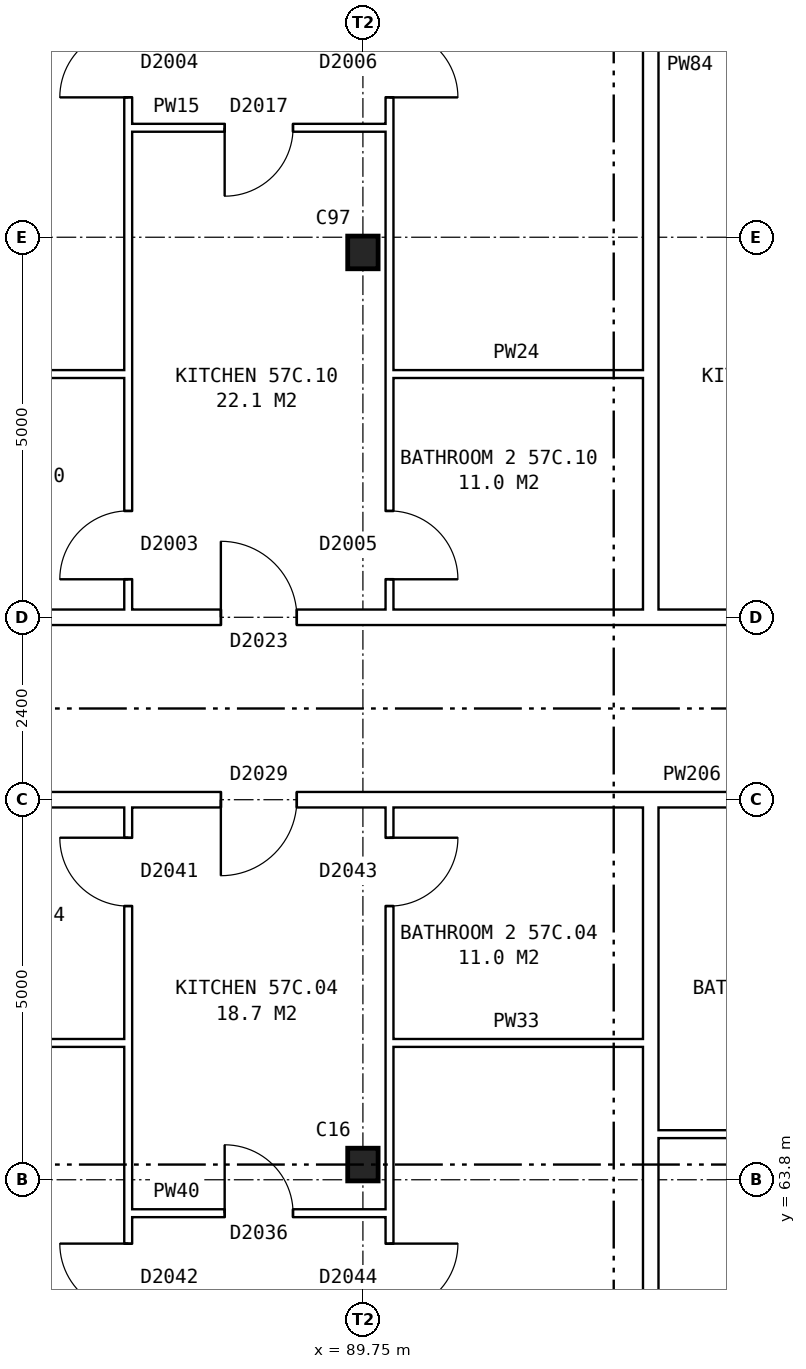
"""IFC4 building model, lengths in metres.
Left out: names, types, materials, properties, quantities, classifications, styles, units other than length and angle.
Written with IfcOpenShell. Run it as: python <this file> out.ifc"""

import sys

from ifc_helpers import new_model, si_unit, direction, frame, frame_2d, origin, origin_2d, place, context, subcontext, project, spatial, rectangle, i_section, extrude, element, fill, save


model = new_model("IFC4")
c1 = context("Model", 3, precision=1e-05, world=origin(), true_north=direction((0.0, 1.0)))
c2 = subcontext(c1, "Body", "Model", "MODEL_VIEW")
j1 = project(units=[si_unit("LENGTHUNIT", "METRE"), si_unit("PLANEANGLEUNIT", "RADIAN")], contexts=[c1])
p1 = place(None, origin())
s1 = spatial("IfcSite", under=j1, at=p1, CompositionType="ELEMENT")
p2 = place(p1, origin())
s2 = spatial("IfcBuilding", under=s1, at=p2, CompositionType="ELEMENT")
p3 = place(p2, frame((0.0, 0.0, 202.8)))
s3 = spatial("IfcBuildingStorey", under=s2, at=p3, CompositionType="ELEMENT", Elevation=202.8)
for number, where, z_axis, x_axis in (
    (1, (89.75, 64.0, 0.0), (0.0, 0.0, 1.0), (1.0, 0.0, 0.0)),
    (2, (89.75, 76.0, 0.0), (0.0, 0.0, 1.0), (1.0, 0.0, 0.0)),
):
    element("IfcColumn", number, at=place(p3, frame(where, z_axis=z_axis, x_axis=x_axis)), inside=s3, PredefinedType="COLUMN", context=c2, shape_type="SweptSolid", body=[
        extrude(i_section(OverallWidth=0.4, OverallDepth=0.43, WebThickness=0.04, FlangeThickness=0.04, at=origin_2d()), origin(), (0.0, 0.0, 1.0), 2.85),
    ])
p4 = place(p3, frame((86.662, 63.36, 0.0), z_axis=(0.0, 0.0, 1.0), x_axis=(1.0, 0.0, 0.0)))
e3 = element("IfcWall", 3, at=p4, inside=s3, PredefinedType="PARTITIONING", context=c2, shape_type="SweptSolid", body=[
    extrude(rectangle(XDim=3.438, YDim=0.1, at=frame_2d((1.719, 0.0))), origin(), (0.0, 0.0, 1.0), 2.85),
])
p5 = place(p4, frame((1.269, 0.0, 0.0)))
e4 = element("IfcOpeningElement", 4, at=p5, cuts=e3, PredefinedType="OPENING", context=c2, shape_type="SweptSolid", body=[
    extrude(rectangle(XDim=0.9, YDim=2.1, at=frame_2d((0.45, 1.05))), frame((0.0, 0.06, 0.0), z_axis=(0.0, -1.0, 0.0), x_axis=(1.0, 0.0, 0.0)), (0.0, 0.0, 1.0), 0.12),
])
p6 = place(p3, frame((93.637, 64.4, 0.0), z_axis=(0.0, 0.0, 1.0), x_axis=(1.0, 0.0, 0.0)))
e5 = element("IfcWall", 5, at=p6, inside=s3, PredefinedType="PARTITIONING", context=c2, shape_type="SweptSolid", body=[
    extrude(rectangle(XDim=3.338, YDim=0.1, at=frame_2d((1.669, 0.0))), origin(), (0.0, 0.0, 1.0), 2.85),
])
p7 = place(p3, frame((83.325, 65.6, 0.0), z_axis=(0.0, 0.0, 1.0), x_axis=(1.0, 0.0, 0.0)))
e6 = element("IfcWall", 6, at=p7, inside=s3, PredefinedType="PARTITIONING", context=c2, shape_type="SweptSolid", body=[
    extrude(rectangle(XDim=3.337, YDim=0.1, at=frame_2d((1.668, 0.0))), origin(), (0.0, 0.0, 1.0), 2.85),
])
p8 = place(p3, frame((90.1, 65.6, 0.0), z_axis=(0.0, 0.0, 1.0), x_axis=(1.0, 0.0, 0.0)))
e7 = element("IfcWall", 7, at=p8, inside=s3, PredefinedType="PARTITIONING", context=c2, shape_type="SweptSolid", body=[
    extrude(rectangle(XDim=3.337, YDim=0.1, at=frame_2d((1.668, 0.0))), origin(), (0.0, 0.0, 1.0), 2.85),
])
p9 = place(p3, frame((75.64, 68.8, 0.0), z_axis=(0.0, 0.0, 1.0), x_axis=(1.0, 0.0, 0.0)))
e8 = element("IfcWall", 8, at=p9, inside=s3, PredefinedType="PARTITIONING", context=c2, shape_type="SweptSolid", body=[
    extrude(rectangle(XDim=55.72, YDim=0.2, at=frame_2d((27.86, 0.0))), origin(), (0.0, 0.0, 1.0), 2.85),
])
p10 = place(p9, frame((5.191, 0.0, 0.0)))
e9 = element("IfcOpeningElement", 9, at=p10, cuts=e8, PredefinedType="OPENING", context=c2, shape_type="SweptSolid", body=[
    extrude(rectangle(XDim=1.0, YDim=2.1, at=frame_2d((0.5, 1.05))), frame((0.0, 0.11, 0.0), z_axis=(0.0, -1.0, 0.0), x_axis=(1.0, 0.0, 0.0)), (0.0, 0.0, 1.0), 0.22),
])
p11 = place(p9, frame((12.241, 0.0, 0.0)))
e10 = element("IfcOpeningElement", 10, at=p11, cuts=e8, PredefinedType="OPENING", context=c2, shape_type="SweptSolid", body=[
    extrude(rectangle(XDim=1.0, YDim=2.1, at=frame_2d((0.5, 1.05))), frame((0.0, 0.11, 0.0), z_axis=(0.0, -1.0, 0.0), x_axis=(1.0, 0.0, 0.0)), (0.0, 0.0, 1.0), 0.22),
])
p12 = place(p9, frame((22.553, 0.0, 0.0)))
e11 = element("IfcOpeningElement", 11, at=p12, cuts=e8, PredefinedType="OPENING", context=c2, shape_type="SweptSolid", body=[
    extrude(rectangle(XDim=1.0, YDim=2.1, at=frame_2d((0.5, 1.05))), frame((0.0, 0.11, 0.0), z_axis=(0.0, -1.0, 0.0), x_axis=(1.0, 0.0, 0.0)), (0.0, 0.0, 1.0), 0.22),
])
p13 = place(p9, frame((32.866, 0.0, 0.0)))
e12 = element("IfcOpeningElement", 12, at=p13, cuts=e8, PredefinedType="OPENING", context=c2, shape_type="SweptSolid", body=[
    extrude(rectangle(XDim=1.0, YDim=2.1, at=frame_2d((0.5, 1.05))), frame((0.0, 0.11, 0.0), z_axis=(0.0, -1.0, 0.0), x_axis=(1.0, 0.0, 0.0)), (0.0, 0.0, 1.0), 0.22),
])
p14 = place(p9, frame((36.303, 0.0, 0.0)))
e13 = element("IfcOpeningElement", 13, at=p14, cuts=e8, PredefinedType="OPENING", context=c2, shape_type="SweptSolid", body=[
    extrude(rectangle(XDim=1.0, YDim=2.1, at=frame_2d((0.5, 1.05))), frame((0.0, 0.11, 0.0), z_axis=(0.0, -1.0, 0.0), x_axis=(1.0, 0.0, 0.0)), (0.0, 0.0, 1.0), 0.22),
])
p15 = place(p9, frame((43.178, 0.0, 0.0)))
e14 = element("IfcOpeningElement", 14, at=p15, cuts=e8, PredefinedType="OPENING", context=c2, shape_type="SweptSolid", body=[
    extrude(rectangle(XDim=1.0, YDim=2.1, at=frame_2d((0.5, 1.05))), frame((0.0, 0.11, 0.0), z_axis=(0.0, -1.0, 0.0), x_axis=(1.0, 0.0, 0.0)), (0.0, 0.0, 1.0), 0.22),
])
p16 = place(p9, frame((50.053, 0.0, 0.0)))
e15 = element("IfcOpeningElement", 15, at=p16, cuts=e8, PredefinedType="OPENING", context=c2, shape_type="SweptSolid", body=[
    extrude(rectangle(XDim=1.0, YDim=2.1, at=frame_2d((0.5, 1.05))), frame((0.0, 0.11, 0.0), z_axis=(0.0, -1.0, 0.0), x_axis=(1.0, 0.0, 0.0)), (0.0, 0.0, 1.0), 0.22),
])
p17 = place(p3, frame((83.225, 71.2, 0.0), z_axis=(0.0, 0.0, 1.0), x_axis=(1.0, 0.0, 0.0)))
e16 = element("IfcWall", 16, at=p17, inside=s3, PredefinedType="PARTITIONING", context=c2, shape_type="SweptSolid", body=[
    extrude(rectangle(XDim=41.25, YDim=0.2, at=frame_2d((20.625, 0.0))), origin(), (0.0, 0.0, 1.0), 2.85),
])
p18 = place(p17, frame((4.656, 0.0, 0.0)))
e17 = element("IfcOpeningElement", 17, at=p18, cuts=e16, PredefinedType="OPENING", context=c2, shape_type="SweptSolid", body=[
    extrude(rectangle(XDim=1.0, YDim=2.1, at=frame_2d((0.5, 1.05))), frame((0.0, 0.11, 0.0), z_axis=(0.0, -1.0, 0.0), x_axis=(1.0, 0.0, 0.0)), (0.0, 0.0, 1.0), 0.22),
])
p19 = place(p17, frame((11.531, 0.0, 0.0)))
e18 = element("IfcOpeningElement", 18, at=p19, cuts=e16, PredefinedType="OPENING", context=c2, shape_type="SweptSolid", body=[
    extrude(rectangle(XDim=1.0, YDim=2.1, at=frame_2d((0.5, 1.05))), frame((0.0, 0.11, 0.0), z_axis=(0.0, -1.0, 0.0), x_axis=(1.0, 0.0, 0.0)), (0.0, 0.0, 1.0), 0.22),
])
p20 = place(p17, frame((21.844, 0.0, 0.0)))
e19 = element("IfcOpeningElement", 19, at=p20, cuts=e16, PredefinedType="OPENING", context=c2, shape_type="SweptSolid", body=[
    extrude(rectangle(XDim=1.0, YDim=2.1, at=frame_2d((0.5, 1.05))), frame((0.0, 0.11, 0.0), z_axis=(0.0, -1.0, 0.0), x_axis=(1.0, 0.0, 0.0)), (0.0, 0.0, 1.0), 0.22),
])
p21 = place(p17, frame((32.156, 0.0, 0.0)))
e20 = element("IfcOpeningElement", 20, at=p21, cuts=e16, PredefinedType="OPENING", context=c2, shape_type="SweptSolid", body=[
    extrude(rectangle(XDim=1.0, YDim=2.1, at=frame_2d((0.5, 1.05))), frame((0.0, 0.11, 0.0), z_axis=(0.0, -1.0, 0.0), x_axis=(1.0, 0.0, 0.0)), (0.0, 0.0, 1.0), 0.22),
])
p22 = place(p17, frame((35.594, 0.0, 0.0)))
e21 = element("IfcOpeningElement", 21, at=p22, cuts=e16, PredefinedType="OPENING", context=c2, shape_type="SweptSolid", body=[
    extrude(rectangle(XDim=1.0, YDim=2.1, at=frame_2d((0.5, 1.05))), frame((0.0, 0.11, 0.0), z_axis=(0.0, -1.0, 0.0), x_axis=(1.0, 0.0, 0.0)), (0.0, 0.0, 1.0), 0.22),
])
p23 = place(p3, frame((83.325, 74.4, 0.0), z_axis=(0.0, 0.0, 1.0), x_axis=(1.0, 0.0, 0.0)))
e22 = element("IfcWall", 22, at=p23, inside=s3, PredefinedType="PARTITIONING", context=c2, shape_type="SweptSolid", body=[
    extrude(rectangle(XDim=3.337, YDim=0.1, at=frame_2d((1.668, 0.0))), origin(), (0.0, 0.0, 1.0), 2.85),
])
p24 = place(p3, frame((90.1, 74.4, 0.0), z_axis=(0.0, 0.0, 1.0), x_axis=(1.0, 0.0, 0.0)))
e23 = element("IfcWall", 23, at=p24, inside=s3, PredefinedType="PARTITIONING", context=c2, shape_type="SweptSolid", body=[
    extrude(rectangle(XDim=3.337, YDim=0.1, at=frame_2d((1.668, 0.0))), origin(), (0.0, 0.0, 1.0), 2.85),
])
p25 = place(p3, frame((86.662, 77.64, 0.0), z_axis=(0.0, 0.0, 1.0), x_axis=(1.0, 0.0, 0.0)))
e24 = element("IfcWall", 24, at=p25, inside=s3, PredefinedType="PARTITIONING", context=c2, shape_type="SweptSolid", body=[
    extrude(rectangle(XDim=3.438, YDim=0.1, at=frame_2d((1.719, 0.0))), origin(), (0.0, 0.0, 1.0), 2.85),
])
p26 = place(p25, frame((1.269, 0.0, 0.0)))
e25 = element("IfcOpeningElement", 25, at=p26, cuts=e24, PredefinedType="OPENING", context=c2, shape_type="SweptSolid", body=[
    extrude(rectangle(XDim=0.9, YDim=2.1, at=frame_2d((0.45, 1.05))), frame((0.0, 0.06, 0.0), z_axis=(0.0, -1.0, 0.0), x_axis=(1.0, 0.0, 0.0)), (0.0, 0.0, 1.0), 0.12),
])
p27 = place(p3, frame((86.662, 54.36, 0.0), z_axis=(0.0, 0.0, 1.0), x_axis=(0.0, 1.0, 0.0)))
e26 = element("IfcWall", 26, at=p27, inside=s3, PredefinedType="PARTITIONING", context=c2, shape_type="SweptSolid", body=[
    extrude(rectangle(XDim=14.34, YDim=0.1, at=frame_2d((7.17, 0.0))), origin(), (0.0, 0.0, 1.0), 2.85),
])
p28 = place(p27, frame((7.7, 0.0, 0.0)))
e27 = element("IfcOpeningElement", 27, at=p28, cuts=e26, PredefinedType="OPENING", context=c2, shape_type="SweptSolid", body=[
    extrude(rectangle(XDim=0.9, YDim=2.1, at=frame_2d((0.45, 1.05))), frame((0.0, 0.06, 0.0), z_axis=(0.0, -1.0, 0.0), x_axis=(1.0, 0.0, 0.0)), (0.0, 0.0, 1.0), 0.12),
])
p29 = place(p27, frame((13.04, 0.0, 0.0)))
e28 = element("IfcOpeningElement", 28, at=p29, cuts=e26, PredefinedType="OPENING", context=c2, shape_type="SweptSolid", body=[
    extrude(rectangle(XDim=0.9, YDim=2.1, at=frame_2d((0.45, 1.05))), frame((0.0, 0.06, 0.0), z_axis=(0.0, -1.0, 0.0), x_axis=(1.0, 0.0, 0.0)), (0.0, 0.0, 1.0), 0.12),
])
p30 = place(p3, frame((86.662, 71.3, 0.0), z_axis=(0.0, 0.0, 1.0), x_axis=(0.0, 1.0, 0.0)))
e29 = element("IfcWall", 29, at=p30, inside=s3, PredefinedType="PARTITIONING", context=c2, shape_type="SweptSolid", body=[
    extrude(rectangle(XDim=14.34, YDim=0.1, at=frame_2d((7.17, 0.0))), origin(), (0.0, 0.0, 1.0), 2.85),
])
p31 = place(p30, frame((6.74, 0.0, 0.0)))
e30 = element("IfcOpeningElement", 30, at=p31, cuts=e29, PredefinedType="OPENING", context=c2, shape_type="SweptSolid", body=[
    extrude(rectangle(XDim=0.9, YDim=2.1, at=frame_2d((0.45, 1.05))), frame((0.0, 0.06, 0.0), z_axis=(0.0, -1.0, 0.0), x_axis=(1.0, 0.0, 0.0)), (0.0, 0.0, 1.0), 0.12),
])
p32 = place(p30, frame((0.4, 0.0, 0.0)))
e31 = element("IfcOpeningElement", 31, at=p32, cuts=e29, PredefinedType="OPENING", context=c2, shape_type="SweptSolid", body=[
    extrude(rectangle(XDim=0.9, YDim=2.1, at=frame_2d((0.45, 1.05))), frame((0.0, 0.06, 0.0), z_axis=(0.0, -1.0, 0.0), x_axis=(1.0, 0.0, 0.0)), (0.0, 0.0, 1.0), 0.12),
])
p33 = place(p3, frame((90.1, 54.36, 0.0), z_axis=(0.0, 0.0, 1.0), x_axis=(0.0, 1.0, 0.0)))
e32 = element("IfcWall", 32, at=p33, inside=s3, PredefinedType="PARTITIONING", context=c2, shape_type="SweptSolid", body=[
    extrude(rectangle(XDim=14.34, YDim=0.1, at=frame_2d((7.17, 0.0))), origin(), (0.0, 0.0, 1.0), 2.85),
])
p34 = place(p33, frame((7.7, 0.0, 0.0)))
e33 = element("IfcOpeningElement", 33, at=p34, cuts=e32, PredefinedType="OPENING", context=c2, shape_type="SweptSolid", body=[
    extrude(rectangle(XDim=0.9, YDim=2.1, at=frame_2d((0.45, 1.05))), frame((0.0, 0.06, 0.0), z_axis=(0.0, -1.0, 0.0), x_axis=(1.0, 0.0, 0.0)), (0.0, 0.0, 1.0), 0.12),
])
p35 = place(p33, frame((13.04, 0.0, 0.0)))
e34 = element("IfcOpeningElement", 34, at=p35, cuts=e32, PredefinedType="OPENING", context=c2, shape_type="SweptSolid", body=[
    extrude(rectangle(XDim=0.9, YDim=2.1, at=frame_2d((0.45, 1.05))), frame((0.0, 0.06, 0.0), z_axis=(0.0, -1.0, 0.0), x_axis=(1.0, 0.0, 0.0)), (0.0, 0.0, 1.0), 0.12),
])
p36 = place(p3, frame((90.1, 71.3, 0.0), z_axis=(0.0, 0.0, 1.0), x_axis=(0.0, 1.0, 0.0)))
e35 = element("IfcWall", 35, at=p36, inside=s3, PredefinedType="PARTITIONING", context=c2, shape_type="SweptSolid", body=[
    extrude(rectangle(XDim=14.34, YDim=0.1, at=frame_2d((7.17, 0.0))), origin(), (0.0, 0.0, 1.0), 2.85),
])
p37 = place(p36, frame((6.74, 0.0, 0.0)))
e36 = element("IfcOpeningElement", 36, at=p37, cuts=e35, PredefinedType="OPENING", context=c2, shape_type="SweptSolid", body=[
    extrude(rectangle(XDim=0.9, YDim=2.1, at=frame_2d((0.45, 1.05))), frame((0.0, 0.06, 0.0), z_axis=(0.0, -1.0, 0.0), x_axis=(1.0, 0.0, 0.0)), (0.0, 0.0, 1.0), 0.12),
])
p38 = place(p36, frame((0.4, 0.0, 0.0)))
e37 = element("IfcOpeningElement", 37, at=p38, cuts=e35, PredefinedType="OPENING", context=c2, shape_type="SweptSolid", body=[
    extrude(rectangle(XDim=0.9, YDim=2.1, at=frame_2d((0.45, 1.05))), frame((0.0, 0.06, 0.0), z_axis=(0.0, -1.0, 0.0), x_axis=(1.0, 0.0, 0.0)), (0.0, 0.0, 1.0), 0.12),
])
for number, where, z_axis, x_axis in (
    (38, (93.537, 54.36, 0.0), (0.0, 0.0, 1.0), (0.0, 1.0, 0.0)),
    (39, (93.537, 71.3, 0.0), (0.0, 0.0, 1.0), (0.0, 1.0, 0.0)),
):
    element("IfcWall", number, at=place(p3, frame(where, z_axis=z_axis, x_axis=x_axis)), inside=s3, PredefinedType="PARTITIONING", context=c2, shape_type="SweptSolid", body=[
        extrude(rectangle(XDim=14.34, YDim=0.2, at=frame_2d((7.17, 0.0))), origin(), (0.0, 0.0, 1.0), 2.85),
    ])
p39 = place(p28, origin())
e40 = element("IfcDoor", 40, at=p39, inside=s3, OperationType="SINGLE_SWING_RIGHT", PredefinedType="DOOR", context=c2, shape_type="SweptSolid", body=[
    extrude(rectangle(XDim=0.9, YDim=2.1, at=frame_2d((0.45, 1.05))), frame((0.0, 0.025, 0.0), z_axis=(0.0, -1.0, 0.0), x_axis=(1.0, 0.0, 0.0)), (0.0, 0.0, 1.0), 0.05),
])
fill(e27, e40)
p40 = place(p34, frame((0.9, 0.0, 0.0), z_axis=(0.0, 0.0, 1.0), x_axis=(-1.0, 0.0, 0.0)))
e41 = element("IfcDoor", 41, at=p40, inside=s3, OperationType="SINGLE_SWING_LEFT", PredefinedType="DOOR", context=c2, shape_type="SweptSolid", body=[
    extrude(rectangle(XDim=0.9, YDim=2.1, at=frame_2d((0.45, 1.05))), frame((0.0, 0.025, 0.0), z_axis=(0.0, -1.0, 0.0), x_axis=(1.0, 0.0, 0.0)), (0.0, 0.0, 1.0), 0.05),
])
fill(e33, e41)
p41 = place(p11, frame((1.0, 0.0, 0.0), z_axis=(0.0, 0.0, 1.0), x_axis=(-1.0, 0.0, 0.0)))
e42 = element("IfcDoor", 42, at=p41, inside=s3, OperationType="SINGLE_SWING_RIGHT", PredefinedType="DOOR", context=c2, shape_type="SweptSolid", body=[
    extrude(rectangle(XDim=1.0, YDim=2.1, at=frame_2d((0.5, 1.05))), frame((0.0, 0.025, 0.0), z_axis=(0.0, -1.0, 0.0), x_axis=(1.0, 0.0, 0.0)), (0.0, 0.0, 1.0), 0.05),
])
fill(e10, e42)
p42 = place(p5, origin())
e43 = element("IfcDoor", 43, at=p42, inside=s3, OperationType="SINGLE_SWING_LEFT", PredefinedType="DOOR", context=c2, shape_type="SweptSolid", body=[
    extrude(rectangle(XDim=0.9, YDim=2.1, at=frame_2d((0.45, 1.05))), frame((0.0, 0.025, 0.0), z_axis=(0.0, -1.0, 0.0), x_axis=(1.0, 0.0, 0.0)), (0.0, 0.0, 1.0), 0.05),
])
fill(e4, e43)
p43 = place(p29, origin())
e44 = element("IfcDoor", 44, at=p43, inside=s3, OperationType="SINGLE_SWING_RIGHT", PredefinedType="DOOR", context=c2, shape_type="SweptSolid", body=[
    extrude(rectangle(XDim=0.9, YDim=2.1, at=frame_2d((0.45, 1.05))), frame((0.0, 0.025, 0.0), z_axis=(0.0, -1.0, 0.0), x_axis=(1.0, 0.0, 0.0)), (0.0, 0.0, 1.0), 0.05),
])
fill(e28, e44)
p44 = place(p35, frame((0.9, 0.0, 0.0), z_axis=(0.0, 0.0, 1.0), x_axis=(-1.0, 0.0, 0.0)))
e45 = element("IfcDoor", 45, at=p44, inside=s3, OperationType="SINGLE_SWING_LEFT", PredefinedType="DOOR", context=c2, shape_type="SweptSolid", body=[
    extrude(rectangle(XDim=0.9, YDim=2.1, at=frame_2d((0.45, 1.05))), frame((0.0, 0.025, 0.0), z_axis=(0.0, -1.0, 0.0), x_axis=(1.0, 0.0, 0.0)), (0.0, 0.0, 1.0), 0.05),
])
fill(e34, e45)
p45 = place(p31, origin())
e46 = element("IfcDoor", 46, at=p45, inside=s3, OperationType="SINGLE_SWING_LEFT", PredefinedType="DOOR", context=c2, shape_type="SweptSolid", body=[
    extrude(rectangle(XDim=0.9, YDim=2.1, at=frame_2d((0.45, 1.05))), frame((0.0, 0.025, 0.0), z_axis=(0.0, -1.0, 0.0), x_axis=(1.0, 0.0, 0.0)), (0.0, 0.0, 1.0), 0.05),
])
fill(e30, e46)
p46 = place(p37, frame((0.9, 0.0, 0.0), z_axis=(0.0, 0.0, 1.0), x_axis=(-1.0, 0.0, 0.0)))
e47 = element("IfcDoor", 47, at=p46, inside=s3, OperationType="SINGLE_SWING_RIGHT", PredefinedType="DOOR", context=c2, shape_type="SweptSolid", body=[
    extrude(rectangle(XDim=0.9, YDim=2.1, at=frame_2d((0.45, 1.05))), frame((0.0, 0.025, 0.0), z_axis=(0.0, -1.0, 0.0), x_axis=(1.0, 0.0, 0.0)), (0.0, 0.0, 1.0), 0.05),
])
fill(e36, e47)
p47 = place(p18, origin())
e48 = element("IfcDoor", 48, at=p47, inside=s3, OperationType="SINGLE_SWING_LEFT", PredefinedType="DOOR", context=c2, shape_type="SweptSolid", body=[
    extrude(rectangle(XDim=1.0, YDim=2.1, at=frame_2d((0.5, 1.05))), frame((0.0, 0.025, 0.0), z_axis=(0.0, -1.0, 0.0), x_axis=(1.0, 0.0, 0.0)), (0.0, 0.0, 1.0), 0.05),
])
fill(e17, e48)
p48 = place(p26, frame((0.9, 0.0, 0.0), z_axis=(0.0, 0.0, 1.0), x_axis=(-1.0, 0.0, 0.0)))
e49 = element("IfcDoor", 49, at=p48, inside=s3, OperationType="SINGLE_SWING_RIGHT", PredefinedType="DOOR", context=c2, shape_type="SweptSolid", body=[
    extrude(rectangle(XDim=0.9, YDim=2.1, at=frame_2d((0.45, 1.05))), frame((0.0, 0.025, 0.0), z_axis=(0.0, -1.0, 0.0), x_axis=(1.0, 0.0, 0.0)), (0.0, 0.0, 1.0), 0.05),
])
fill(e25, e49)
p49 = place(p32, origin())
e50 = element("IfcDoor", 50, at=p49, inside=s3, OperationType="SINGLE_SWING_LEFT", PredefinedType="DOOR", context=c2, shape_type="SweptSolid", body=[
    extrude(rectangle(XDim=0.9, YDim=2.1, at=frame_2d((0.45, 1.05))), frame((0.0, 0.025, 0.0), z_axis=(0.0, -1.0, 0.0), x_axis=(1.0, 0.0, 0.0)), (0.0, 0.0, 1.0), 0.05),
])
fill(e31, e50)
p50 = place(p38, frame((0.9, 0.0, 0.0), z_axis=(0.0, 0.0, 1.0), x_axis=(-1.0, 0.0, 0.0)))
e51 = element("IfcDoor", 51, at=p50, inside=s3, OperationType="SINGLE_SWING_RIGHT", PredefinedType="DOOR", context=c2, shape_type="SweptSolid", body=[
    extrude(rectangle(XDim=0.9, YDim=2.1, at=frame_2d((0.45, 1.05))), frame((0.0, 0.025, 0.0), z_axis=(0.0, -1.0, 0.0), x_axis=(1.0, 0.0, 0.0)), (0.0, 0.0, 1.0), 0.05),
])
fill(e37, e51)
save(model, sys.argv[1])
